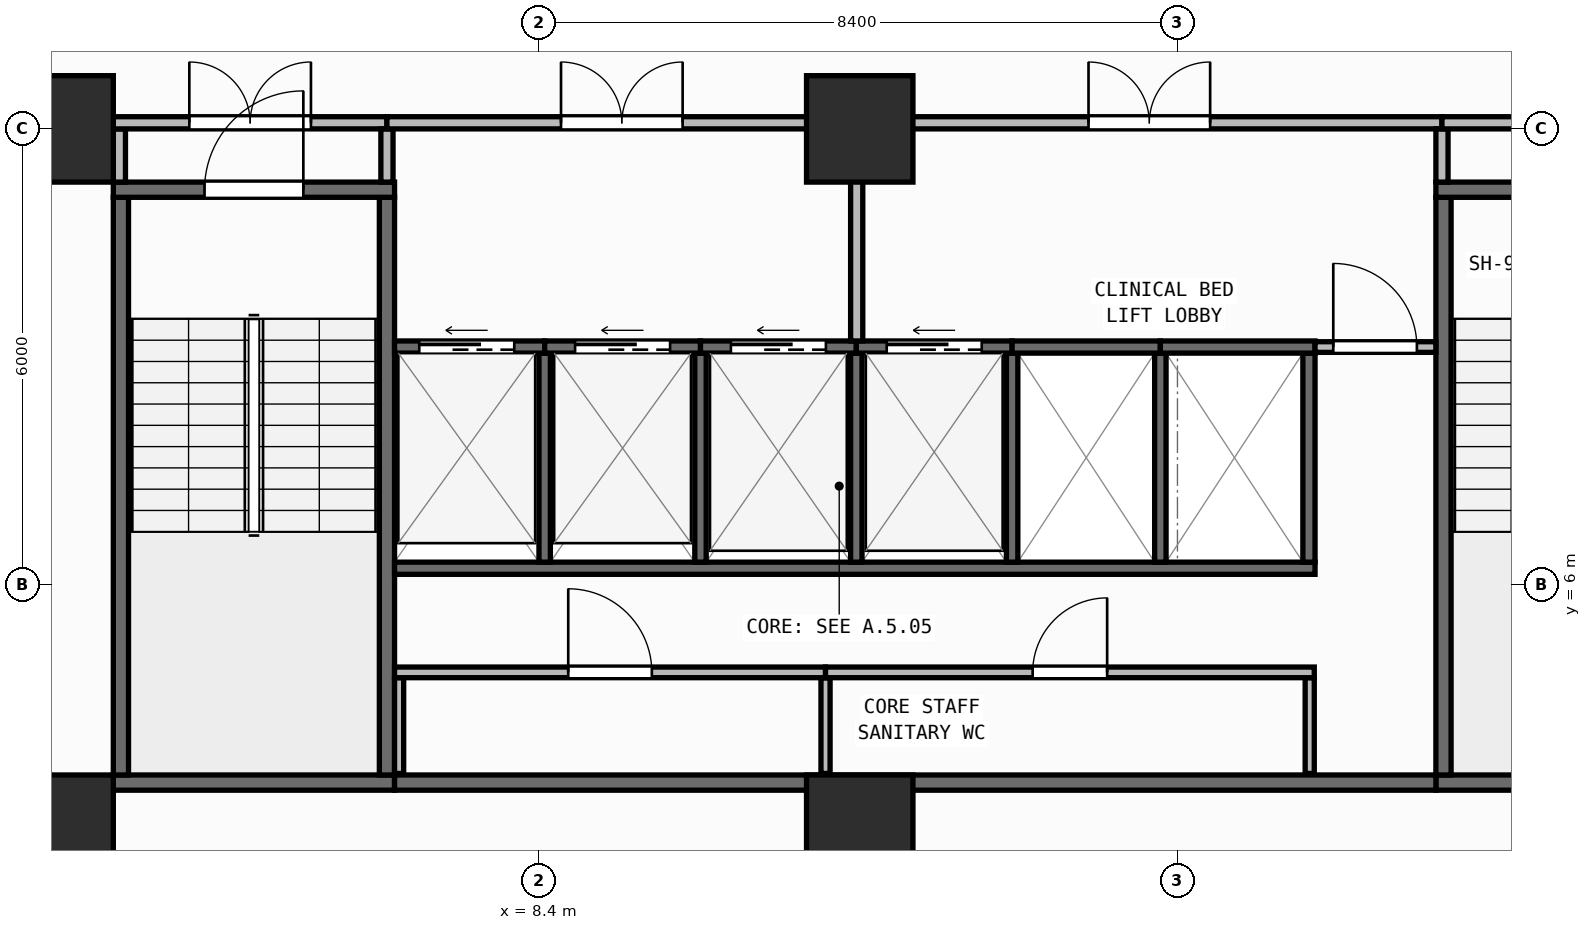
"""IFC4 building model, lengths in metres.
Left out: names, types, materials, properties, quantities, classifications, styles, units other than length and angle.
Written with IfcOpenShell. Run it as: python <this file> out.ifc"""

import sys

from ifc_helpers import new_model, si_unit, direction, frame, frame_2d, origin, origin_2d, place, context, subcontext, project, spatial, rectangle, extrude, element, fill, save


model = new_model("IFC4")
c1 = context("Model", 3, precision=1e-05, world=origin(), true_north=direction((0.0, 1.0)))
c2 = subcontext(c1, "Body", "Model", "MODEL_VIEW")
j1 = project(units=[si_unit("LENGTHUNIT", "METRE"), si_unit("PLANEANGLEUNIT", "RADIAN")], contexts=[c1])
p1 = place(None, origin())
s1 = spatial("IfcSite", under=j1, at=p1, CompositionType="ELEMENT")
p2 = place(p1, origin())
s2 = spatial("IfcBuilding", under=s1, at=p2, CompositionType="ELEMENT")
p3 = place(p2, frame((0.0, 0.0, 34.35)))
s3 = spatial("IfcBuildingStorey", under=s2, at=p3, CompositionType="ELEMENT", Elevation=34.35)
for number, where, z_axis, x_axis in (
    (1, (2.1, 2.8, 0.0), (0.0, 0.0, 1.0), (1.0, 0.0, 0.0)),
    (2, (12.62, 2.8, 0.0), (0.0, 0.0, 1.0), (1.0, 0.0, 0.0)),
    (3, (2.1, 12.0, 0.0), (0.0, 0.0, 1.0), (1.0, 0.0, 0.0)),
    (4, (12.62, 12.0, 0.0), (0.0, 0.0, 1.0), (1.0, 0.0, 0.0)),
):
    element("IfcColumn", number, at=place(p3, frame(where, z_axis=z_axis, x_axis=x_axis)), inside=s3, PredefinedType="COLUMN", context=c2, shape_type="SweptSolid", body=[
        extrude(rectangle(XDim=1.4, YDim=1.4, at=origin_2d()), origin(), (0.0, 0.0, 1.0), 3.95),
    ])
p4 = place(p3, frame((2.76, 0.174, 0.0), z_axis=(0.0, 0.0, 1.0), x_axis=(0.996571478456, 0.082736257641, 0.0)))
e5 = element("IfcWall", 5, at=p4, inside=s3, PredefinedType="STANDARD", context=c2, shape_type="SweptSolid", body=[
    extrude(rectangle(XDim=52.861, YDim=0.26, at=frame_2d((26.431, 0.0))), origin(), (0.0, 0.0, 1.0), 3.71),
])
p5 = place(p4, frame((25.231, 0.0, 0.9)))
e6 = element("IfcOpeningElement", 6, at=p5, cuts=e5, PredefinedType="OPENING", context=c2, shape_type="SweptSolid", body=[
    extrude(rectangle(XDim=2.4, YDim=1.65, at=frame_2d((1.2, 0.825))), frame((0.0, 0.14, 0.0), z_axis=(0.0, -1.0, 0.0), x_axis=(1.0, 0.0, 0.0)), (0.0, 0.0, 1.0), 0.28),
])
p6 = place(p3, frame((2.8, 3.4, 0.0), z_axis=(0.0, 0.0, 1.0), x_axis=(1.0, 0.0, 0.0)))
e7 = element("IfcWall", 7, at=p6, inside=s3, PredefinedType="SHEAR", context=c2, shape_type="SweptSolid", body=[
    extrude(rectangle(XDim=3.7, YDim=0.2, at=frame_2d((1.85, 0.0))), origin(), (0.0, 0.0, 1.0), 3.71),
])
for number, where, z_axis, x_axis in (
    (8, (2.9, 3.5, 0.0), (0.0, 0.0, 1.0), (0.0, 1.0, 0.0)),
    (9, (6.4, 3.5, 0.0), (0.0, 0.0, 1.0), (0.0, 1.0, 0.0)),
):
    element("IfcWall", number, at=place(p3, frame(where, z_axis=z_axis, x_axis=x_axis)), inside=s3, PredefinedType="SHEAR", context=c2, shape_type="SweptSolid", body=[
        extrude(rectangle(XDim=7.6, YDim=0.2, at=frame_2d((3.8, 0.0))), origin(), (0.0, 0.0, 1.0), 3.71),
    ])
p7 = place(p3, frame((2.8, 11.2, 0.0), z_axis=(0.0, 0.0, 1.0), x_axis=(1.0, 0.0, 0.0)))
e10 = element("IfcWall", 10, at=p7, inside=s3, PredefinedType="SHEAR", context=c2, shape_type="SweptSolid", body=[
    extrude(rectangle(XDim=3.7, YDim=0.2, at=frame_2d((1.85, 0.0))), origin(), (0.0, 0.0, 1.0), 3.71),
])
p8 = place(p7, frame((1.2, 0.0, 0.0)))
e11 = element("IfcOpeningElement", 11, at=p8, cuts=e10, PredefinedType="OPENING", context=c2, shape_type="SweptSolid", body=[
    extrude(rectangle(XDim=1.3, YDim=2.15, at=frame_2d((0.65, 1.075))), frame((0.0, 0.11, 0.0), z_axis=(0.0, -1.0, 0.0), x_axis=(1.0, 0.0, 0.0)), (0.0, 0.0, 1.0), 0.22),
])
p9 = place(p3, frame((20.2, 3.4, 0.0), z_axis=(0.0, 0.0, 1.0), x_axis=(1.0, 0.0, 0.0)))
e12 = element("IfcWall", 12, at=p9, inside=s3, PredefinedType="SHEAR", context=c2, shape_type="SweptSolid", body=[
    extrude(rectangle(XDim=3.7, YDim=0.2, at=frame_2d((1.85, 0.0))), origin(), (0.0, 0.0, 1.0), 3.71),
])
p10 = place(p3, frame((20.3, 3.5, 0.0), z_axis=(0.0, 0.0, 1.0), x_axis=(0.0, 1.0, 0.0)))
e13 = element("IfcWall", 13, at=p10, inside=s3, PredefinedType="SHEAR", context=c2, shape_type="SweptSolid", body=[
    extrude(rectangle(XDim=7.6, YDim=0.2, at=frame_2d((3.8, 0.0))), origin(), (0.0, 0.0, 1.0), 3.71),
])
p11 = place(p3, frame((20.2, 11.2, 0.0), z_axis=(0.0, 0.0, 1.0), x_axis=(1.0, 0.0, 0.0)))
e14 = element("IfcWall", 14, at=p11, inside=s3, PredefinedType="SHEAR", context=c2, shape_type="SweptSolid", body=[
    extrude(rectangle(XDim=3.7, YDim=0.2, at=frame_2d((1.85, 0.0))), origin(), (0.0, 0.0, 1.0), 3.71),
])
p12 = place(p11, frame((1.2, 0.0, 0.0)))
e15 = element("IfcOpeningElement", 15, at=p12, cuts=e14, PredefinedType="OPENING", context=c2, shape_type="SweptSolid", body=[
    extrude(rectangle(XDim=1.3, YDim=2.15, at=frame_2d((0.65, 1.075))), frame((0.0, 0.11, 0.0), z_axis=(0.0, -1.0, 0.0), x_axis=(1.0, 0.0, 0.0)), (0.0, 0.0, 1.0), 0.22),
])
p13 = place(p3, frame((6.5, 3.4, 0.0), z_axis=(0.0, 0.0, 1.0), x_axis=(1.0, 0.0, 0.0)))
e16 = element("IfcWall", 16, at=p13, inside=s3, PredefinedType="SHEAR", context=c2, shape_type="SweptSolid", body=[
    extrude(rectangle(XDim=13.7, YDim=0.2, at=frame_2d((6.85, 0.0))), origin(), (0.0, 0.0, 1.0), 3.71),
])
p14 = place(p3, frame((6.5, 6.22, 0.0), z_axis=(0.0, 0.0, 1.0), x_axis=(1.0, 0.0, 0.0)))
e17 = element("IfcWall", 17, at=p14, inside=s3, PredefinedType="SHEAR", context=c2, shape_type="SweptSolid", body=[
    extrude(rectangle(XDim=12.11, YDim=0.16, at=frame_2d((6.055, 0.0))), origin(), (0.0, 0.0, 1.0), 3.71),
])
p15 = place(p3, frame((18.53, 6.3, 0.0), z_axis=(0.0, 0.0, 1.0), x_axis=(0.0, 1.0, 0.0)))
e18 = element("IfcWall", 18, at=p15, inside=s3, PredefinedType="SHEAR", context=c2, shape_type="SweptSolid", body=[
    extrude(rectangle(XDim=2.75, YDim=0.16, at=frame_2d((1.375, 0.0))), origin(), (0.0, 0.0, 1.0), 3.71),
])
for number, where, z_axis, x_axis in (
    (19, (8.475, 6.3, 0.0), (0.0, 0.0, 1.0), (0.0, 1.0, 0.0)),
    (20, (10.525, 6.3, 0.0), (0.0, 0.0, 1.0), (0.0, 1.0, 0.0)),
    (21, (12.575, 6.3, 0.0), (0.0, 0.0, 1.0), (0.0, 1.0, 0.0)),
    (22, (14.625, 6.3, 0.0), (0.0, 0.0, 1.0), (0.0, 1.0, 0.0)),
    (23, (16.575, 6.3, 0.0), (0.0, 0.0, 1.0), (0.0, 1.0, 0.0)),
):
    element("IfcWall", number, at=place(p3, frame(where, z_axis=z_axis, x_axis=x_axis)), inside=s3, PredefinedType="SHEAR", context=c2, shape_type="SweptSolid", body=[
        extrude(rectangle(XDim=2.75, YDim=0.15, at=frame_2d((1.375, 0.0))), origin(), (0.0, 0.0, 1.0), 3.71),
    ])
p16 = place(p3, frame((6.5, 9.13, 0.0), z_axis=(0.0, 0.0, 1.0), x_axis=(1.0, 0.0, 0.0)))
e24 = element("IfcWall", 24, at=p16, inside=s3, PredefinedType="SHEAR", context=c2, shape_type="SweptSolid", body=[
    extrude(rectangle(XDim=1.975, YDim=0.16, at=frame_2d((0.988, 0.0))), origin(), (0.0, 0.0, 1.0), 3.71),
])
p17 = place(p16, frame((0.325, 0.0, 0.0)))
e25 = element("IfcOpeningElement", 25, at=p17, cuts=e24, PredefinedType="OPENING", context=c2, shape_type="SweptSolid", body=[
    extrude(rectangle(XDim=1.25, YDim=2.15, at=frame_2d((0.625, 1.075))), frame((0.0, 0.09, 0.0), z_axis=(0.0, -1.0, 0.0), x_axis=(1.0, 0.0, 0.0)), (0.0, 0.0, 1.0), 0.18),
])
p18 = place(p3, frame((8.475, 9.13, 0.0), z_axis=(0.0, 0.0, 1.0), x_axis=(1.0, 0.0, 0.0)))
e26 = element("IfcWall", 26, at=p18, inside=s3, PredefinedType="SHEAR", context=c2, shape_type="SweptSolid", body=[
    extrude(rectangle(XDim=2.05, YDim=0.16, at=frame_2d((1.025, 0.0))), origin(), (0.0, 0.0, 1.0), 3.71),
])
p19 = place(p18, frame((0.4, 0.0, 0.0)))
e27 = element("IfcOpeningElement", 27, at=p19, cuts=e26, PredefinedType="OPENING", context=c2, shape_type="SweptSolid", body=[
    extrude(rectangle(XDim=1.25, YDim=2.15, at=frame_2d((0.625, 1.075))), frame((0.0, 0.09, 0.0), z_axis=(0.0, -1.0, 0.0), x_axis=(1.0, 0.0, 0.0)), (0.0, 0.0, 1.0), 0.18),
])
p20 = place(p3, frame((10.525, 9.13, 0.0), z_axis=(0.0, 0.0, 1.0), x_axis=(1.0, 0.0, 0.0)))
e28 = element("IfcWall", 28, at=p20, inside=s3, PredefinedType="SHEAR", context=c2, shape_type="SweptSolid", body=[
    extrude(rectangle(XDim=2.05, YDim=0.16, at=frame_2d((1.025, 0.0))), origin(), (0.0, 0.0, 1.0), 3.71),
])
p21 = place(p20, frame((0.4, 0.0, 0.0)))
e29 = element("IfcOpeningElement", 29, at=p21, cuts=e28, PredefinedType="OPENING", context=c2, shape_type="SweptSolid", body=[
    extrude(rectangle(XDim=1.25, YDim=2.15, at=frame_2d((0.625, 1.075))), frame((0.0, 0.09, 0.0), z_axis=(0.0, -1.0, 0.0), x_axis=(1.0, 0.0, 0.0)), (0.0, 0.0, 1.0), 0.18),
])
p22 = place(p3, frame((12.575, 9.13, 0.0), z_axis=(0.0, 0.0, 1.0), x_axis=(1.0, 0.0, 0.0)))
e30 = element("IfcWall", 30, at=p22, inside=s3, PredefinedType="SHEAR", context=c2, shape_type="SweptSolid", body=[
    extrude(rectangle(XDim=2.05, YDim=0.16, at=frame_2d((1.025, 0.0))), origin(), (0.0, 0.0, 1.0), 3.71),
])
p23 = place(p22, frame((0.4, 0.0, 0.0)))
e31 = element("IfcOpeningElement", 31, at=p23, cuts=e30, PredefinedType="OPENING", context=c2, shape_type="SweptSolid", body=[
    extrude(rectangle(XDim=1.25, YDim=2.15, at=frame_2d((0.625, 1.075))), frame((0.0, 0.09, 0.0), z_axis=(0.0, -1.0, 0.0), x_axis=(1.0, 0.0, 0.0)), (0.0, 0.0, 1.0), 0.18),
])
p24 = place(p3, frame((14.625, 9.13, 0.0), z_axis=(0.0, 0.0, 1.0), x_axis=(1.0, 0.0, 0.0)))
e32 = element("IfcWall", 32, at=p24, inside=s3, PredefinedType="SHEAR", context=c2, shape_type="SweptSolid", body=[
    extrude(rectangle(XDim=1.95, YDim=0.16, at=frame_2d((0.975, 0.0))), origin(), (0.0, 0.0, 1.0), 3.71),
])
p25 = place(p3, frame((16.575, 9.13, 0.0), z_axis=(0.0, 0.0, 1.0), x_axis=(1.0, 0.0, 0.0)))
e33 = element("IfcWall", 33, at=p25, inside=s3, PredefinedType="SHEAR", context=c2, shape_type="SweptSolid", body=[
    extrude(rectangle(XDim=2.035, YDim=0.16, at=frame_2d((1.018, 0.0))), origin(), (0.0, 0.0, 1.0), 3.71),
])
for number, where, z_axis, x_axis in (
    (34, (6.56, 3.52, 0.0), (0.0, 0.0, 1.0), (0.0, 1.0, 0.0)),
    (35, (12.17, 3.52, 0.0), (0.0, 0.0, 1.0), (0.0, 1.0, 0.0)),
    (36, (18.54, 3.52, 0.0), (0.0, 0.0, 1.0), (0.0, 1.0, 0.0)),
):
    element("IfcWall", number, at=place(p3, frame(where, z_axis=z_axis, x_axis=x_axis)), inside=s3, PredefinedType="PARTITIONING", context=c2, shape_type="SweptSolid", body=[
        extrude(rectangle(XDim=1.26, YDim=0.12, at=frame_2d((0.63, 0.0))), origin(), (0.0, 0.0, 1.0), 3.71),
    ])
p26 = place(p3, frame((6.5, 4.85, 0.0), z_axis=(0.0, 0.0, 1.0), x_axis=(1.0, 0.0, 0.0)))
e37 = element("IfcWall", 37, at=p26, inside=s3, PredefinedType="PARTITIONING", context=c2, shape_type="SweptSolid", body=[
    extrude(rectangle(XDim=5.67, YDim=0.14, at=frame_2d((2.835, 0.0))), origin(), (0.0, 0.0, 1.0), 3.71),
])
p27 = place(p26, frame((2.285, 0.0, 0.0)))
e38 = element("IfcOpeningElement", 38, at=p27, cuts=e37, PredefinedType="OPENING", context=c2, shape_type="SweptSolid", body=[
    extrude(rectangle(XDim=1.1, YDim=2.1, at=frame_2d((0.55, 1.05))), frame((0.0, 0.08, 0.0), z_axis=(0.0, -1.0, 0.0), x_axis=(1.0, 0.0, 0.0)), (0.0, 0.0, 1.0), 0.16),
])
p28 = place(p3, frame((12.17, 4.85, 0.0), z_axis=(0.0, 0.0, 1.0), x_axis=(1.0, 0.0, 0.0)))
e39 = element("IfcWall", 39, at=p28, inside=s3, PredefinedType="PARTITIONING", context=c2, shape_type="SweptSolid", body=[
    extrude(rectangle(XDim=6.43, YDim=0.14, at=frame_2d((3.215, 0.0))), origin(), (0.0, 0.0, 1.0), 3.71),
])
p29 = place(p28, frame((2.725, 0.0, 0.0)))
e40 = element("IfcOpeningElement", 40, at=p29, cuts=e39, PredefinedType="OPENING", context=c2, shape_type="SweptSolid", body=[
    extrude(rectangle(XDim=0.98, YDim=2.1, at=frame_2d((0.49, 1.05))), frame((0.0, 0.08, 0.0), z_axis=(0.0, -1.0, 0.0), x_axis=(1.0, 0.0, 0.0)), (0.0, 0.0, 1.0), 0.16),
])
p30 = place(p3, frame((18.61, 9.13, 0.0), z_axis=(0.0, 0.0, 1.0), x_axis=(1.0, 0.0, 0.0)))
e41 = element("IfcWall", 41, at=p30, inside=s3, PredefinedType="PARTITIONING", context=c2, shape_type="SweptSolid", body=[
    extrude(rectangle(XDim=1.59, YDim=0.14, at=frame_2d((0.795, 0.0))), origin(), (0.0, 0.0, 1.0), 3.71),
])
p31 = place(p30, frame((0.24, 0.0, 0.0)))
e42 = element("IfcOpeningElement", 42, at=p31, cuts=e41, PredefinedType="OPENING", context=c2, shape_type="SweptSolid", body=[
    extrude(rectangle(XDim=1.1, YDim=2.1, at=frame_2d((0.55, 1.05))), frame((0.0, 0.08, 0.0), z_axis=(0.0, -1.0, 0.0), x_axis=(1.0, 0.0, 0.0)), (0.0, 0.0, 1.0), 0.16),
])
p32 = place(p3, frame((2.88, 11.3, 0.0), z_axis=(0.0, 0.0, 1.0), x_axis=(0.0, 1.0, 0.0)))
e43 = element("IfcWall", 43, at=p32, inside=s3, PredefinedType="PARTITIONING", context=c2, shape_type="SweptSolid", body=[
    extrude(rectangle(XDim=0.7, YDim=0.16, at=frame_2d((0.35, 0.0))), origin(), (0.0, 0.0, 1.0), 3.71),
])
p33 = place(p3, frame((2.8, 12.08, 0.0), z_axis=(0.0, 0.0, 1.0), x_axis=(1.0, 0.0, 0.0)))
e44 = element("IfcWall", 44, at=p33, inside=s3, PredefinedType="PARTITIONING", context=c2, shape_type="SweptSolid", body=[
    extrude(rectangle(XDim=3.6, YDim=0.16, at=frame_2d((1.8, 0.0))), origin(), (0.0, 0.0, 1.0), 3.073),
])
p34 = place(p33, frame((1.0, 0.0, 0.0)))
e45 = element("IfcOpeningElement", 45, at=p34, cuts=e44, PredefinedType="OPENING", context=c2, shape_type="SweptSolid", body=[
    extrude(rectangle(XDim=1.6, YDim=2.05, at=frame_2d((0.8, 1.025))), frame((0.0, 0.09, 0.0), z_axis=(0.0, -1.0, 0.0), x_axis=(1.0, 0.0, 0.0)), (0.0, 0.0, 1.0), 0.18),
])
p35 = place(p3, frame((6.4, 11.3, 0.0), z_axis=(0.0, 0.0, 1.0), x_axis=(0.0, 1.0, 0.0)))
e46 = element("IfcWall", 46, at=p35, inside=s3, PredefinedType="PARTITIONING", context=c2, shape_type="SweptSolid", body=[
    extrude(rectangle(XDim=0.7, YDim=0.16, at=frame_2d((0.35, 0.0))), origin(), (0.0, 0.0, 1.0), 3.71),
])
p36 = place(p3, frame((6.4, 12.08, 0.0), z_axis=(0.0, 0.0, 1.0), x_axis=(1.0, 0.0, 0.0)))
e47 = element("IfcWall", 47, at=p36, inside=s3, PredefinedType="PARTITIONING", context=c2, shape_type="SweptSolid", body=[
    extrude(rectangle(XDim=6.18, YDim=0.16, at=frame_2d((3.09, 0.0))), origin(), (0.0, 0.0, 1.0), 3.073),
])
p37 = place(p36, frame((2.29, 0.0, 0.0)))
e48 = element("IfcOpeningElement", 48, at=p37, cuts=e47, PredefinedType="OPENING", context=c2, shape_type="SweptSolid", body=[
    extrude(rectangle(XDim=1.6, YDim=2.05, at=frame_2d((0.8, 1.025))), frame((0.0, 0.09, 0.0), z_axis=(0.0, -1.0, 0.0), x_axis=(1.0, 0.0, 0.0)), (0.0, 0.0, 1.0), 0.18),
])
p38 = place(p3, frame((12.58, 9.21, 0.0), z_axis=(0.0, 0.0, 1.0), x_axis=(0.0, 1.0, 0.0)))
e49 = element("IfcWall", 49, at=p38, inside=s3, PredefinedType="PARTITIONING", context=c2, shape_type="SweptSolid", body=[
    extrude(rectangle(XDim=2.79, YDim=0.16, at=frame_2d((1.395, 0.0))), origin(), (0.0, 0.0, 1.0), 3.71),
])
p39 = place(p3, frame((12.58, 12.08, 0.0), z_axis=(0.0, 0.0, 1.0), x_axis=(1.0, 0.0, 0.0)))
e50 = element("IfcWall", 50, at=p39, inside=s3, PredefinedType="PARTITIONING", context=c2, shape_type="SweptSolid", body=[
    extrude(rectangle(XDim=7.7, YDim=0.16, at=frame_2d((3.85, 0.0))), origin(), (0.0, 0.0, 1.0), 3.073),
])
p40 = place(p39, frame((3.05, 0.0, 0.0)))
e51 = element("IfcOpeningElement", 51, at=p40, cuts=e50, PredefinedType="OPENING", context=c2, shape_type="SweptSolid", body=[
    extrude(rectangle(XDim=1.6, YDim=2.05, at=frame_2d((0.8, 1.025))), frame((0.0, 0.09, 0.0), z_axis=(0.0, -1.0, 0.0), x_axis=(1.0, 0.0, 0.0)), (0.0, 0.0, 1.0), 0.18),
])
p41 = place(p3, frame((20.28, 11.3, 0.0), z_axis=(0.0, 0.0, 1.0), x_axis=(0.0, 1.0, 0.0)))
e52 = element("IfcWall", 52, at=p41, inside=s3, PredefinedType="PARTITIONING", context=c2, shape_type="SweptSolid", body=[
    extrude(rectangle(XDim=0.7, YDim=0.16, at=frame_2d((0.35, 0.0))), origin(), (0.0, 0.0, 1.0), 3.71),
])
p42 = place(p3, frame((20.28, 12.08, 0.0), z_axis=(0.0, 0.0, 1.0), x_axis=(1.0, 0.0, 0.0)))
e53 = element("IfcWall", 53, at=p42, inside=s3, PredefinedType="PARTITIONING", context=c2, shape_type="SweptSolid", body=[
    extrude(rectangle(XDim=3.62, YDim=0.16, at=frame_2d((1.81, 0.0))), origin(), (0.0, 0.0, 1.0), 3.073),
])
p43 = place(p42, frame((1.01, 0.0, 0.0)))
e54 = element("IfcOpeningElement", 54, at=p43, cuts=e53, PredefinedType="OPENING", context=c2, shape_type="SweptSolid", body=[
    extrude(rectangle(XDim=1.6, YDim=2.05, at=frame_2d((0.8, 1.025))), frame((0.0, 0.09, 0.0), z_axis=(0.0, -1.0, 0.0), x_axis=(1.0, 0.0, 0.0)), (0.0, 0.0, 1.0), 0.18),
])
p44 = place(p8, origin())
e55 = element("IfcDoor", 55, at=p44, inside=s3, OperationType="SINGLE_SWING_RIGHT", PredefinedType="DOOR", context=c2, shape_type="SweptSolid", body=[
    extrude(rectangle(XDim=1.3, YDim=2.15, at=frame_2d((0.65, 1.075))), frame((0.0, 0.025, 0.0), z_axis=(0.0, -1.0, 0.0), x_axis=(1.0, 0.0, 0.0)), (0.0, 0.0, 1.0), 0.05),
])
fill(e11, e55)
p45 = place(p17, origin())
e56 = element("IfcDoor", 56, at=p45, inside=s3, OperationType="SLIDING_TO_LEFT", PredefinedType="DOOR", context=c2, shape_type="SweptSolid", body=[
    extrude(rectangle(XDim=1.25, YDim=2.15, at=frame_2d((0.625, 1.075))), frame((0.0, 0.025, 0.0), z_axis=(0.0, -1.0, 0.0), x_axis=(1.0, 0.0, 0.0)), (0.0, 0.0, 1.0), 0.05),
])
fill(e25, e56)
p46 = place(p19, origin())
e57 = element("IfcDoor", 57, at=p46, inside=s3, OperationType="SLIDING_TO_LEFT", PredefinedType="DOOR", context=c2, shape_type="SweptSolid", body=[
    extrude(rectangle(XDim=1.25, YDim=2.15, at=frame_2d((0.625, 1.075))), frame((0.0, 0.025, 0.0), z_axis=(0.0, -1.0, 0.0), x_axis=(1.0, 0.0, 0.0)), (0.0, 0.0, 1.0), 0.05),
])
fill(e27, e57)
p47 = place(p21, origin())
e58 = element("IfcDoor", 58, at=p47, inside=s3, OperationType="SLIDING_TO_LEFT", PredefinedType="DOOR", context=c2, shape_type="SweptSolid", body=[
    extrude(rectangle(XDim=1.25, YDim=2.15, at=frame_2d((0.625, 1.075))), frame((0.0, 0.025, 0.0), z_axis=(0.0, -1.0, 0.0), x_axis=(1.0, 0.0, 0.0)), (0.0, 0.0, 1.0), 0.05),
])
fill(e29, e58)
p48 = place(p23, origin())
e59 = element("IfcDoor", 59, at=p48, inside=s3, OperationType="SLIDING_TO_LEFT", PredefinedType="DOOR", context=c2, shape_type="SweptSolid", body=[
    extrude(rectangle(XDim=1.25, YDim=2.15, at=frame_2d((0.625, 1.075))), frame((0.0, 0.025, 0.0), z_axis=(0.0, -1.0, 0.0), x_axis=(1.0, 0.0, 0.0)), (0.0, 0.0, 1.0), 0.05),
])
fill(e31, e59)
p49 = place(p27, origin())
e60 = element("IfcDoor", 60, at=p49, inside=s3, OperationType="SINGLE_SWING_LEFT", PredefinedType="DOOR", context=c2, shape_type="SweptSolid", body=[
    extrude(rectangle(XDim=1.1, YDim=2.1, at=frame_2d((0.55, 1.05))), frame((0.0, 0.025, 0.0), z_axis=(0.0, -1.0, 0.0), x_axis=(1.0, 0.0, 0.0)), (0.0, 0.0, 1.0), 0.05),
])
fill(e38, e60)
p50 = place(p29, origin())
e61 = element("IfcDoor", 61, at=p50, inside=s3, OperationType="SINGLE_SWING_RIGHT", PredefinedType="DOOR", context=c2, shape_type="SweptSolid", body=[
    extrude(rectangle(XDim=0.98, YDim=2.1, at=frame_2d((0.49, 1.05))), frame((0.0, 0.025, 0.0), z_axis=(0.0, -1.0, 0.0), x_axis=(1.0, 0.0, 0.0)), (0.0, 0.0, 1.0), 0.05),
])
fill(e40, e61)
p51 = place(p31, origin())
e62 = element("IfcDoor", 62, at=p51, inside=s3, OperationType="SINGLE_SWING_LEFT", PredefinedType="DOOR", context=c2, shape_type="SweptSolid", body=[
    extrude(rectangle(XDim=1.1, YDim=2.1, at=frame_2d((0.55, 1.05))), frame((0.0, 0.025, 0.0), z_axis=(0.0, -1.0, 0.0), x_axis=(1.0, 0.0, 0.0)), (0.0, 0.0, 1.0), 0.05),
])
fill(e42, e62)
p52 = place(p34, origin())
e63 = element("IfcDoor", 63, at=p52, inside=s3, OperationType="DOUBLE_DOOR_SINGLE_SWING", PredefinedType="DOOR", context=c2, shape_type="SweptSolid", body=[
    extrude(rectangle(XDim=1.6, YDim=2.05, at=frame_2d((0.8, 1.025))), frame((0.0, 0.025, 0.0), z_axis=(0.0, -1.0, 0.0), x_axis=(1.0, 0.0, 0.0)), (0.0, 0.0, 1.0), 0.05),
])
fill(e45, e63)
p53 = place(p37, origin())
e64 = element("IfcDoor", 64, at=p53, inside=s3, OperationType="DOUBLE_DOOR_SINGLE_SWING", PredefinedType="DOOR", context=c2, shape_type="SweptSolid", body=[
    extrude(rectangle(XDim=1.6, YDim=2.05, at=frame_2d((0.8, 1.025))), frame((0.0, 0.025, 0.0), z_axis=(0.0, -1.0, 0.0), x_axis=(1.0, 0.0, 0.0)), (0.0, 0.0, 1.0), 0.05),
])
fill(e48, e64)
p54 = place(p40, origin())
e65 = element("IfcDoor", 65, at=p54, inside=s3, OperationType="DOUBLE_DOOR_SINGLE_SWING", PredefinedType="DOOR", context=c2, shape_type="SweptSolid", body=[
    extrude(rectangle(XDim=1.6, YDim=2.05, at=frame_2d((0.8, 1.025))), frame((0.0, 0.025, 0.0), z_axis=(0.0, -1.0, 0.0), x_axis=(1.0, 0.0, 0.0)), (0.0, 0.0, 1.0), 0.05),
])
fill(e51, e65)
save(model, sys.argv[1])
